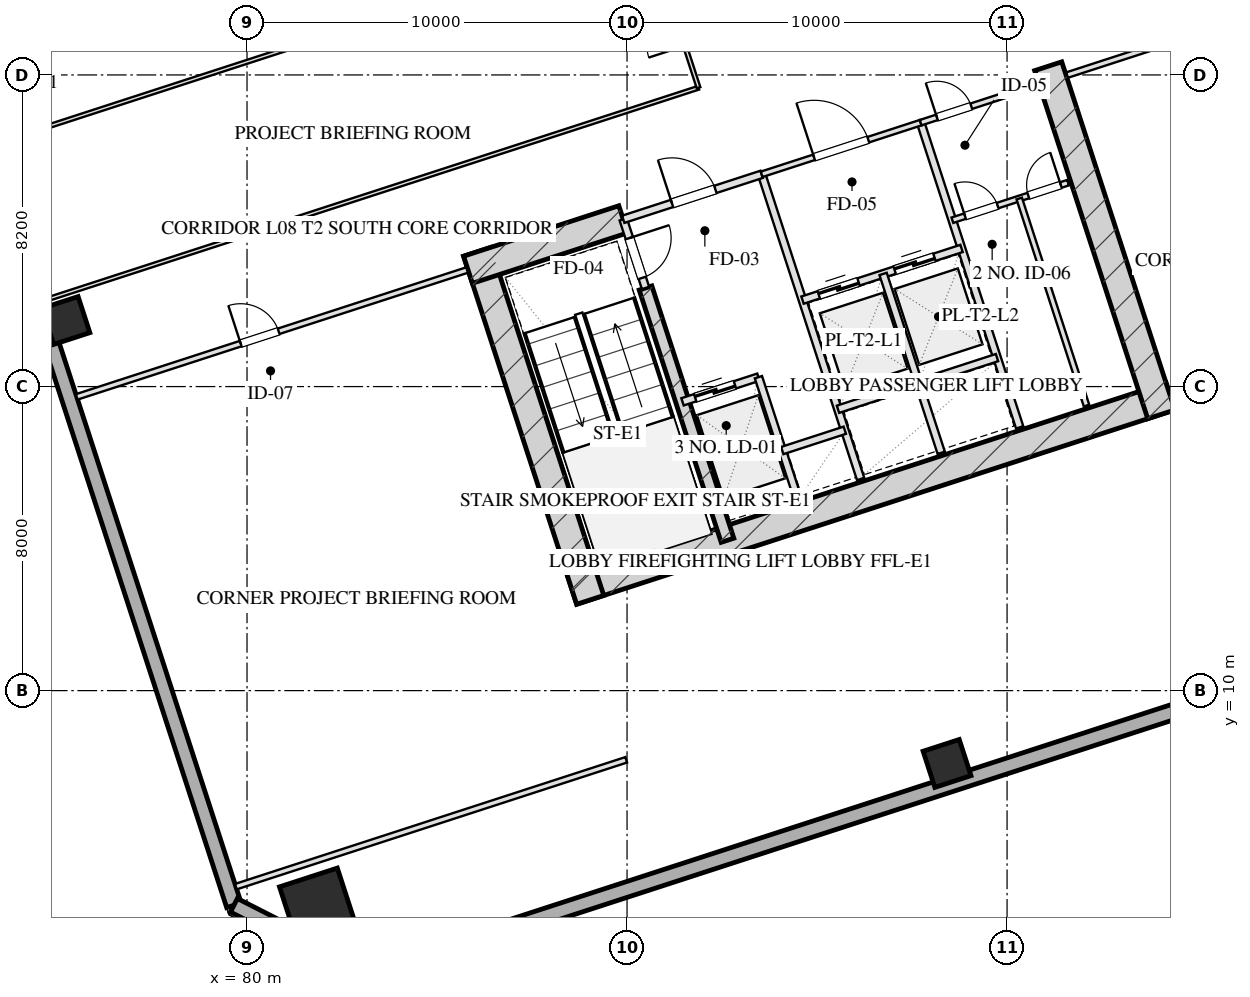
"""IFC4 building model, lengths in metres.
Left out: names, types, materials, properties, quantities, classifications, styles, units other than length and angle.
Written with IfcOpenShell. Run it as: python <this file> out.ifc"""

import sys

from ifc_helpers import new_model, si_unit, direction, frame, frame_2d, origin, origin_2d, place, context, subcontext, project, spatial, rectangle, hollow_rectangle, extrude, element, fill, save


model = new_model("IFC4")
c1 = context("Model", 3, precision=1e-05, world=origin(), true_north=direction((0.0, 1.0)))
c2 = subcontext(c1, "Body", "Model", "MODEL_VIEW")
j1 = project(units=[si_unit("LENGTHUNIT", "METRE"), si_unit("PLANEANGLEUNIT", "RADIAN")], contexts=[c1])
p1 = place(None, origin())
s1 = spatial("IfcSite", under=j1, at=p1, CompositionType="ELEMENT")
p2 = place(p1, origin())
s2 = spatial("IfcBuilding", under=s1, at=p2, CompositionType="ELEMENT")
p3 = place(p2, frame((0.0, 0.0, 38.0)))
s3 = spatial("IfcBuildingStorey", under=s2, at=p3, CompositionType="ELEMENT", Elevation=38.0)
p4 = place(p3, frame((88.559, 12.629, 0.0), z_axis=(0.0, 0.0, 1.0), x_axis=(0.951056072937, 0.309018358888, 0.0)))
e1 = element("IfcWall", 1, at=p4, inside=s3, PredefinedType="SHEAR", context=c2, shape_type="SweptSolid", body=[
    extrude(rectangle(XDim=16.55, YDim=0.75, at=frame_2d((8.275, 0.0))), origin(), (0.0, 0.0, 1.0), 4.0),
])
p5 = place(p3, frame((86.055, 21.546, 0.0), z_axis=(0.0, 0.0, 1.0), x_axis=(0.309023585745, -0.951054374604, 0.0)))
e2 = element("IfcWall", 2, at=p5, inside=s3, PredefinedType="SHEAR", context=c2, shape_type="SweptSolid", body=[
    extrude(rectangle(XDim=9.63, YDim=0.75, at=frame_2d((4.815, 0.0))), origin(), (0.0, 0.0, 1.0), 4.0),
])
p6 = place(p3, frame((101.082, 26.429, 0.0), z_axis=(0.0, 0.0, 1.0), x_axis=(0.309016134813, -0.951056795583, 0.0)))
e3 = element("IfcWall", 3, at=p6, inside=s3, PredefinedType="SHEAR", context=c2, shape_type="SweptSolid", body=[
    extrude(rectangle(XDim=9.63, YDim=0.75, at=frame_2d((4.815, 0.0))), origin(), (0.0, 0.0, 1.0), 4.0),
])
p7 = place(p3, frame((90.486, 20.594, 0.0), z_axis=(0.0, 0.0, 1.0), x_axis=(0.309020428229, -0.951055400562, 0.0)))
e4 = element("IfcWall", 4, at=p7, inside=s3, PredefinedType="SHEAR", context=c2, shape_type="SweptSolid", body=[
    extrude(rectangle(XDim=6.98, YDim=0.35, at=frame_2d((3.49, 0.0))), origin(), (0.0, 0.0, 1.0), 4.0),
])
p8 = place(p3, frame((85.814, 21.074, 0.0), z_axis=(0.0, 0.0, 1.0), x_axis=(0.95106580992, 0.308988390074, 0.0)))
e5 = element("IfcWall", 5, at=p8, inside=s3, PredefinedType="SHEAR", context=c2, shape_type="SweptSolid", body=[
    extrude(rectangle(XDim=4.295, YDim=0.75, at=frame_2d((2.147, 0.0))), origin(), (0.0, 0.0, 1.0), 4.0),
])
p9 = place(p3, frame((81.863, 4.323, 0.0), z_axis=(0.0, 0.0, 1.0), x_axis=(0.951056516295, 0.309016994375, 0.0)))
e6 = element("IfcColumn", 6, at=p9, inside=s3, PredefinedType="COLUMN", context=c2, shape_type="SweptSolid", body=[
    extrude(hollow_rectangle(XDim=1.6, YDim=1.6, WallThickness=0.055, at=origin_2d()), origin(), (0.0, 0.0, 1.0), 4.001),
])
for number, where, z_axis, x_axis in (
    (7, (75.234, 19.739, 0.0), (0.0, 0.0, 1.0), (0.951, 0.309, 0.0)),
    (8, (98.421, 8.084, 0.0), (0.0, 0.0, 1.0), (0.951, 0.309, 0.0)),
):
    element("IfcColumn", number, at=place(p3, frame(where, z_axis=z_axis, x_axis=x_axis)), inside=s3, PredefinedType="COLUMN", context=c2, shape_type="SweptSolid", body=[
        extrude(hollow_rectangle(XDim=1.0, YDim=1.0, WallThickness=0.036, at=origin_2d()), origin(), (0.0, 0.0, 1.0), 4.001),
    ])
p10 = place(p3, frame((79.655, 4.352, 0.0), z_axis=(0.0, 0.0, 1.0), x_axis=(-0.309014526607, 0.951057318118, 0.0)))
e9 = element("IfcWall", 9, at=p10, inside=s3, PredefinedType="SOLIDWALL", context=c2, shape_type="SweptSolid", body=[
    extrude(rectangle(XDim=50.0, YDim=0.4, at=frame_2d((25.0, 0.0))), origin(), (0.0, 0.0, 1.0), 3.16),
])
p11 = place(p10, frame((21.85, 0.0, 0.0)))
e10 = element("IfcOpeningElement", 10, at=p11, cuts=e9, PredefinedType="OPENING", context=c2, shape_type="SweptSolid", body=[
    extrude(rectangle(XDim=1.1, YDim=2.15, at=frame_2d((0.55, 1.075))), frame((0.0, 0.21, 0.0), z_axis=(0.0, -1.0, 0.0), x_axis=(1.0, 0.0, 0.0)), (0.0, 0.0, 1.0), 0.42),
])
p12 = place(p3, frame((100.345, 63.648, 0.0), z_axis=(0.0, 0.0, 1.0), x_axis=(0.309014526607, -0.951057318118, 0.0)))
e11 = element("IfcWall", 11, at=p12, inside=s3, PredefinedType="SOLIDWALL", context=c2, shape_type="SweptSolid", body=[
    extrude(rectangle(XDim=50.0, YDim=0.4, at=frame_2d((25.0, 0.0))), origin(), (0.0, 0.0, 1.0), 3.16),
])
p13 = place(p12, frame((17.35, 0.0, 0.75)))
e12 = element("IfcOpeningElement", 12, at=p13, cuts=e11, PredefinedType="OPENING", context=c2, shape_type="SweptSolid", body=[
    extrude(rectangle(XDim=2.5, YDim=1.75, at=frame_2d((1.25, 0.875))), frame((0.0, 0.21, 0.0), z_axis=(0.0, -1.0, 0.0), x_axis=(1.0, 0.0, 0.0)), (0.0, 0.0, 1.0), 0.42),
])
p14 = place(p12, frame((30.25, 0.0, 0.0)))
e13 = element("IfcOpeningElement", 13, at=p14, cuts=e11, PredefinedType="OPENING", context=c2, shape_type="SweptSolid", body=[
    extrude(rectangle(XDim=1.1, YDim=2.15, at=frame_2d((0.55, 1.075))), frame((0.0, 0.21, 0.0), z_axis=(0.0, -1.0, 0.0), x_axis=(1.0, 0.0, 0.0)), (0.0, 0.0, 1.0), 0.42),
])
p15 = place(p3, frame((113.998, 12.567, 0.0), z_axis=(0.0, 0.0, 1.0), x_axis=(-0.951055939317, -0.309018770125, 0.0)))
e14 = element("IfcWall", 14, at=p15, inside=s3, PredefinedType="SOLIDWALL", context=c2, shape_type="SweptSolid", body=[
    extrude(rectangle(XDim=32.4, YDim=0.4, at=frame_2d((16.2, 0.0))), origin(), (0.0, 0.0, 1.0), 3.16),
])
p16 = place(p3, frame((83.184, 2.554, 0.0), z_axis=(0.0, 0.0, 1.0), x_axis=(-0.890998089617, 0.454007053137, 0.0)))
e15 = element("IfcWall", 15, at=p16, inside=s3, PredefinedType="SOLIDWALL", context=c2, shape_type="SweptSolid", body=[
    extrude(rectangle(XDim=3.96, YDim=0.4, at=frame_2d((1.98, 0.0))), origin(), (0.0, 0.0, 1.0), 3.16),
])
p17 = place(p3, frame((89.899, 22.401, 0.0), z_axis=(0.0, 0.0, 1.0), x_axis=(0.308932062672, -0.951084108086, 0.0)))
e16 = element("IfcWall", 16, at=p17, inside=s3, PredefinedType="PARTITIONING", context=c2, shape_type="SweptSolid", body=[
    extrude(rectangle(XDim=1.9, YDim=0.2, at=frame_2d((0.95, 0.0))), origin(), (0.0, 0.0, 1.0), 3.725),
])
p18 = place(p17, frame((0.52, 0.0, 0.0)))
e17 = element("IfcOpeningElement", 17, at=p18, cuts=e16, PredefinedType="OPENING", context=c2, shape_type="SweptSolid", body=[
    extrude(rectangle(XDim=1.1, YDim=2.05, at=frame_2d((0.55, 1.025))), frame((0.0, 0.11, 0.0), z_axis=(0.0, -1.0, 0.0), x_axis=(1.0, 0.0, 0.0)), (0.0, 0.0, 1.0), 0.22),
])
p19 = place(p3, frame((93.542, 23.585, 0.0), z_axis=(0.0, 0.0, 1.0), x_axis=(0.309042196757, -0.951048327176, 0.0)))
e18 = element("IfcWall", 18, at=p19, inside=s3, PredefinedType="PARTITIONING", context=c2, shape_type="SweptSolid", body=[
    extrude(rectangle(XDim=8.43, YDim=0.2, at=frame_2d((4.215, 0.0))), origin(), (0.0, 0.0, 1.0), 3.725),
])
p20 = place(p3, frame((89.899, 22.401, 0.0), z_axis=(0.0, 0.0, 1.0), x_axis=(0.951046716504, 0.309047153403, 0.0)))
e19 = element("IfcWall", 19, at=p20, inside=s3, PredefinedType="PARTITIONING", context=c2, shape_type="SweptSolid", body=[
    extrude(rectangle(XDim=3.83, YDim=0.2, at=frame_2d((1.915, 0.0))), origin(), (0.0, 0.0, 1.0), 3.725),
])
p21 = place(p20, frame((1.35, 0.0, 0.0)))
e20 = element("IfcOpeningElement", 20, at=p21, cuts=e19, PredefinedType="OPENING", context=c2, shape_type="SweptSolid", body=[
    extrude(rectangle(XDim=1.2, YDim=2.05, at=frame_2d((0.6, 1.025))), frame((0.0, 0.11, 0.0), z_axis=(0.0, -1.0, 0.0), x_axis=(1.0, 0.0, 0.0)), (0.0, 0.0, 1.0), 0.22),
])
p22 = place(p3, frame((91.46, 17.598, 0.0), z_axis=(0.0, 0.0, 1.0), x_axis=(0.951062257173, 0.308999325213, 0.0)))
e21 = element("IfcWall", 21, at=p22, inside=s3, PredefinedType="PARTITIONING", context=c2, shape_type="SweptSolid", body=[
    extrude(rectangle(XDim=2.1, YDim=0.2, at=frame_2d((1.05, 0.0))), origin(), (0.0, 0.0, 1.0), 3.725),
])
p23 = place(p22, frame((0.35, 0.0, 0.0)))
e22 = element("IfcOpeningElement", 22, at=p23, cuts=e21, PredefinedType="OPENING", context=c2, shape_type="SweptSolid", body=[
    extrude(rectangle(XDim=1.1, YDim=2.05, at=frame_2d((0.55, 1.025))), frame((0.0, 0.11, 0.0), z_axis=(0.0, -1.0, 0.0), x_axis=(1.0, 0.0, 0.0)), (0.0, 0.0, 1.0), 0.22),
])
p24 = place(p3, frame((93.457, 18.247, 0.0), z_axis=(0.0, 0.0, 1.0), x_axis=(0.3089935693, -0.951064127245, 0.0)))
e23 = element("IfcWall", 23, at=p24, inside=s3, PredefinedType="PARTITIONING", context=c2, shape_type="SweptSolid", body=[
    extrude(rectangle(XDim=3.7, YDim=0.2, at=frame_2d((1.85, 0.0))), origin(), (0.0, 0.0, 1.0), 3.725),
])
p25 = place(p3, frame((94.084, 16.317, 0.0), z_axis=(0.0, 0.0, 1.0), x_axis=(0.951041328149, 0.309063734775, 0.0)))
e24 = element("IfcWall", 24, at=p25, inside=s3, PredefinedType="PARTITIONING", context=c2, shape_type="SweptSolid", body=[
    extrude(rectangle(XDim=1.73, YDim=0.2, at=frame_2d((0.865, 0.0))), origin(), (0.0, 0.0, 1.0), 3.725),
])
p26 = place(p3, frame((97.727, 24.944, 0.0), z_axis=(0.0, 0.0, 1.0), x_axis=(0.309016001439, -0.951056838919, 0.0)))
e25 = element("IfcWall", 25, at=p26, inside=s3, PredefinedType="PARTITIONING", context=c2, shape_type="SweptSolid", body=[
    extrude(rectangle(XDim=8.43, YDim=0.2, at=frame_2d((4.215, 0.0))), origin(), (0.0, 0.0, 1.0), 3.725),
])
p27 = place(p3, frame((93.542, 23.585, 0.0), z_axis=(0.0, 0.0, 1.0), x_axis=(0.951063829732, 0.308994485023, 0.0)))
e26 = element("IfcWall", 26, at=p27, inside=s3, PredefinedType="PARTITIONING", context=c2, shape_type="SweptSolid", body=[
    extrude(rectangle(XDim=4.4, YDim=0.15, at=frame_2d((2.2, 0.0))), origin(), (0.0, 0.0, 1.0), 3.725),
])
p28 = place(p27, frame((1.45, 0.0, 0.0)))
e27 = element("IfcOpeningElement", 27, at=p28, cuts=e26, PredefinedType="OPENING", context=c2, shape_type="SweptSolid", body=[
    extrude(rectangle(XDim=1.5, YDim=2.05, at=frame_2d((0.75, 1.025))), frame((0.0, 0.085, 0.0), z_axis=(0.0, -1.0, 0.0), x_axis=(1.0, 0.0, 0.0)), (0.0, 0.0, 1.0), 0.17),
])
p29 = place(p3, frame((94.617, 20.275, 0.0), z_axis=(0.0, 0.0, 1.0), x_axis=(0.951058531764, 0.30901079133, 0.0)))
e28 = element("IfcWall", 28, at=p29, inside=s3, PredefinedType="PARTITIONING", context=c2, shape_type="SweptSolid", body=[
    extrude(rectangle(XDim=4.4, YDim=0.2, at=frame_2d((2.2, 0.0))), origin(), (0.0, 0.0, 1.0), 3.725),
])
p30 = place(p29, frame((0.45, 0.0, 0.0)))
e29 = element("IfcOpeningElement", 29, at=p30, cuts=e28, PredefinedType="OPENING", context=c2, shape_type="SweptSolid", body=[
    extrude(rectangle(XDim=1.1, YDim=2.05, at=frame_2d((0.55, 1.025))), frame((0.0, 0.11, 0.0), z_axis=(0.0, -1.0, 0.0), x_axis=(1.0, 0.0, 0.0)), (0.0, 0.0, 1.0), 0.22),
])
p31 = place(p29, frame((2.55, 0.0, 0.0)))
e30 = element("IfcOpeningElement", 30, at=p31, cuts=e28, PredefinedType="OPENING", context=c2, shape_type="SweptSolid", body=[
    extrude(rectangle(XDim=1.1, YDim=2.05, at=frame_2d((0.55, 1.025))), frame((0.0, 0.11, 0.0), z_axis=(0.0, -1.0, 0.0), x_axis=(1.0, 0.0, 0.0)), (0.0, 0.0, 1.0), 0.22),
])
p32 = place(p3, frame((96.738, 20.964, 0.0), z_axis=(0.0, 0.0, 1.0), x_axis=(0.309042578481, -0.951048203135, 0.0)))
e31 = element("IfcWall", 31, at=p32, inside=s3, PredefinedType="PARTITIONING", context=c2, shape_type="SweptSolid", body=[
    extrude(rectangle(XDim=4.95, YDim=0.2, at=frame_2d((2.475, 0.0))), origin(), (0.0, 0.0, 1.0), 3.725),
])
p33 = place(p3, frame((95.551, 17.403, 0.0), z_axis=(0.0, 0.0, 1.0), x_axis=(0.951058531764, 0.30901079133, 0.0)))
e32 = element("IfcWall", 32, at=p33, inside=s3, PredefinedType="PARTITIONING", context=c2, shape_type="SweptSolid", body=[
    extrude(rectangle(XDim=4.4, YDim=0.2, at=frame_2d((2.2, 0.0))), origin(), (0.0, 0.0, 1.0), 3.725),
])
p34 = place(p3, frame((97.727, 24.944, 0.0), z_axis=(0.0, 0.0, 1.0), x_axis=(0.951036872128, 0.309077446369, 0.0)))
e33 = element("IfcWall", 33, at=p34, inside=s3, PredefinedType="PARTITIONING", context=c2, shape_type="SweptSolid", body=[
    extrude(rectangle(XDim=3.2, YDim=0.15, at=frame_2d((1.6, 0.0))), origin(), (0.0, 0.0, 1.0), 3.725),
])
p35 = place(p34, frame((0.45, 0.0, 0.0)))
e34 = element("IfcOpeningElement", 34, at=p35, cuts=e33, PredefinedType="OPENING", context=c2, shape_type="SweptSolid", body=[
    extrude(rectangle(XDim=0.95, YDim=2.05, at=frame_2d((0.475, 1.025))), frame((0.0, 0.085, 0.0), z_axis=(0.0, -1.0, 0.0), x_axis=(1.0, 0.0, 0.0)), (0.0, 0.0, 1.0), 0.17),
])
p36 = place(p3, frame((98.561, 22.376, 0.0), z_axis=(0.0, 0.0, 1.0), x_axis=(0.95104415986, 0.309055020985, 0.0)))
e35 = element("IfcWall", 35, at=p36, inside=s3, PredefinedType="PARTITIONING", context=c2, shape_type="SweptSolid", body=[
    extrude(rectangle(XDim=3.2, YDim=0.15, at=frame_2d((1.6, 0.0))), origin(), (0.0, 0.0, 1.0), 3.725),
])
p37 = place(p36, frame((0.35, 0.0, 0.0)))
e36 = element("IfcOpeningElement", 36, at=p37, cuts=e35, PredefinedType="OPENING", context=c2, shape_type="SweptSolid", body=[
    extrude(rectangle(XDim=0.9, YDim=2.05, at=frame_2d((0.45, 1.025))), frame((0.0, 0.085, 0.0), z_axis=(0.0, -1.0, 0.0), x_axis=(1.0, 0.0, 0.0)), (0.0, 0.0, 1.0), 0.17),
])
p38 = place(p36, frame((2.1, 0.0, 0.0)))
e37 = element("IfcOpeningElement", 37, at=p38, cuts=e35, PredefinedType="OPENING", context=c2, shape_type="SweptSolid", body=[
    extrude(rectangle(XDim=0.9, YDim=2.05, at=frame_2d((0.45, 1.025))), frame((0.0, 0.085, 0.0), z_axis=(0.0, -1.0, 0.0), x_axis=(1.0, 0.0, 0.0)), (0.0, 0.0, 1.0), 0.17),
])
p39 = place(p3, frame((100.32, 22.948, 0.0), z_axis=(0.0, 0.0, 1.0), x_axis=(0.309035009867, -0.951050662518, 0.0)))
e38 = element("IfcWall", 38, at=p39, inside=s3, PredefinedType="PARTITIONING", context=c2, shape_type="SweptSolid", body=[
    extrude(rectangle(XDim=5.73, YDim=0.15, at=frame_2d((2.865, 0.0))), origin(), (0.0, 0.0, 1.0), 3.725),
])
p40 = place(p3, frame((79.707, 4.842, 0.0), z_axis=(0.0, 0.0, 1.0), x_axis=(0.951056658866, 0.309016555588, 0.0)))
e39 = element("IfcWall", 39, at=p40, inside=s3, PredefinedType="PARTITIONING", context=c2, shape_type="SweptSolid", body=[
    extrude(rectangle(XDim=10.8, YDim=0.15, at=frame_2d((5.4, 0.0))), origin(), (0.0, 0.0, 1.0), 3.725),
])
p41 = place(p3, frame((75.519, 17.729, 0.0), z_axis=(0.0, 0.0, 1.0), x_axis=(0.951056658866, 0.309016555588, 0.0)))
e40 = element("IfcWall", 40, at=p41, inside=s3, PredefinedType="PARTITIONING", context=c2, shape_type="SweptSolid", body=[
    extrude(rectangle(XDim=10.8, YDim=0.15, at=frame_2d((5.4, 0.0))), origin(), (0.0, 0.0, 1.0), 3.725),
])
p42 = place(p41, frame((4.536, 0.0, 0.0)))
e41 = element("IfcOpeningElement", 41, at=p42, cuts=e40, PredefinedType="OPENING", context=c2, shape_type="SweptSolid", body=[
    extrude(rectangle(XDim=1.05, YDim=2.05, at=frame_2d((0.525, 1.025))), frame((0.0, 0.085, 0.0), z_axis=(0.0, -1.0, 0.0), x_axis=(1.0, 0.0, 0.0)), (0.0, 0.0, 1.0), 0.17),
])
p43 = place(p3, frame((101.578, 26.196, 0.0), z_axis=(0.0, 0.0, 1.0), x_axis=(0.951059043131, 0.309009217467, 0.0)))
e42 = element("IfcWall", 42, at=p43, inside=s3, PredefinedType="PARTITIONING", context=c2, shape_type="SweptSolid", body=[
    extrude(rectangle(XDim=10.2, YDim=0.15, at=frame_2d((5.1, 0.0))), origin(), (0.0, 0.0, 1.0), 3.725),
])
p44 = place(p43, frame((4.284, 0.0, 0.0)))
e43 = element("IfcOpeningElement", 43, at=p44, cuts=e42, PredefinedType="OPENING", context=c2, shape_type="SweptSolid", body=[
    extrude(rectangle(XDim=1.0, YDim=2.05, at=frame_2d((0.5, 1.025))), frame((0.0, 0.085, 0.0), z_axis=(0.0, -1.0, 0.0), x_axis=(1.0, 0.0, 0.0)), (0.0, 0.0, 1.0), 0.17),
])
p45 = place(p3, frame((74.691, 20.278, 0.0), z_axis=(0.0, 0.0, 1.0), x_axis=(0.951053521786, 0.309026210375, 0.0)))
e44 = element("IfcWall", 44, at=p45, inside=s3, PredefinedType="MOVABLE", context=c2, shape_type="SweptSolid", body=[
    extrude(rectangle(XDim=18.075, YDim=0.1, at=frame_2d((9.038, 0.0))), origin(), (0.0, 0.0, 1.0), 3.725),
])
p46 = place(p3, frame((91.882, 25.863, 0.0), z_axis=(0.0, 0.0, 1.0), x_axis=(-0.309022042254, 0.951054876125, 0.0)))
e45 = element("IfcWall", 45, at=p46, inside=s3, PredefinedType="MOVABLE", context=c2, shape_type="SweptSolid", body=[
    extrude(rectangle(XDim=16.64, YDim=0.1, at=frame_2d((8.32, 0.0))), origin(), (0.0, 0.0, 1.0), 3.725),
])
p47 = place(p46, frame((1.16, 0.0, 0.0)))
e46 = element("IfcOpeningElement", 46, at=p47, cuts=e45, PredefinedType="OPENING", context=c2, shape_type="SweptSolid", body=[
    extrude(rectangle(XDim=1.0, YDim=2.05, at=frame_2d((0.5, 1.025))), frame((0.0, 0.06, 0.0), z_axis=(0.0, -1.0, 0.0), x_axis=(1.0, 0.0, 0.0)), (0.0, 0.0, 1.0), 0.12),
])
p48 = place(p46, frame((6.16, 0.0, 0.0)))
e47 = element("IfcOpeningElement", 47, at=p48, cuts=e45, PredefinedType="OPENING", context=c2, shape_type="SweptSolid", body=[
    extrude(rectangle(XDim=1.0, YDim=2.05, at=frame_2d((0.5, 1.025))), frame((0.0, 0.06, 0.0), z_axis=(0.0, -1.0, 0.0), x_axis=(1.0, 0.0, 0.0)), (0.0, 0.0, 1.0), 0.12),
])
p49 = place(p46, frame((10.16, 0.0, 0.0)))
e48 = element("IfcOpeningElement", 48, at=p49, cuts=e45, PredefinedType="OPENING", context=c2, shape_type="SweptSolid", body=[
    extrude(rectangle(XDim=1.0, YDim=2.05, at=frame_2d((0.5, 1.025))), frame((0.0, 0.06, 0.0), z_axis=(0.0, -1.0, 0.0), x_axis=(1.0, 0.0, 0.0)), (0.0, 0.0, 1.0), 0.12),
])
p50 = place(p46, frame((14.48, 0.0, 0.0)))
e49 = element("IfcOpeningElement", 49, at=p50, cuts=e45, PredefinedType="OPENING", context=c2, shape_type="SweptSolid", body=[
    extrude(rectangle(XDim=1.05, YDim=2.05, at=frame_2d((0.525, 1.025))), frame((0.0, 0.06, 0.0), z_axis=(0.0, -1.0, 0.0), x_axis=(1.0, 0.0, 0.0)), (0.0, 0.0, 1.0), 0.12),
])
p51 = place(p3, frame((73.356, 24.386, 0.0), z_axis=(0.0, 0.0, 1.0), x_axis=(0.951057491432, 0.309013993197, 0.0)))
e50 = element("IfcWall", 50, at=p51, inside=s3, PredefinedType="MOVABLE", context=c2, shape_type="SweptSolid", body=[
    extrude(rectangle(XDim=18.075, YDim=0.1, at=frame_2d((9.038, 0.0))), origin(), (0.0, 0.0, 1.0), 3.725),
])
p52 = place(p18, origin())
e51 = element("IfcDoor", 51, at=p52, inside=s3, OperationType="SINGLE_SWING_LEFT", PredefinedType="DOOR", context=c2, shape_type="SweptSolid", body=[
    extrude(rectangle(XDim=1.1, YDim=2.05, at=frame_2d((0.55, 1.025))), frame((0.0, 0.025, 0.0), z_axis=(0.0, -1.0, 0.0), x_axis=(1.0, 0.0, 0.0)), (0.0, 0.0, 1.0), 0.05),
])
fill(e17, e51)
p53 = place(p21, origin())
e52 = element("IfcDoor", 52, at=p53, inside=s3, OperationType="SINGLE_SWING_LEFT", PredefinedType="DOOR", context=c2, shape_type="SweptSolid", body=[
    extrude(rectangle(XDim=1.2, YDim=2.05, at=frame_2d((0.6, 1.025))), frame((0.0, 0.025, 0.0), z_axis=(0.0, -1.0, 0.0), x_axis=(1.0, 0.0, 0.0)), (0.0, 0.0, 1.0), 0.05),
])
fill(e20, e52)
p54 = place(p23, origin())
e53 = element("IfcDoor", 53, at=p54, inside=s3, OperationType="DOUBLE_DOOR_SLIDING", PredefinedType="DOOR", context=c2, shape_type="SweptSolid", body=[
    extrude(rectangle(XDim=1.1, YDim=2.05, at=frame_2d((0.55, 1.025))), frame((0.0, 0.025, 0.0), z_axis=(0.0, -1.0, 0.0), x_axis=(1.0, 0.0, 0.0)), (0.0, 0.0, 1.0), 0.05),
])
fill(e22, e53)
p55 = place(p28, origin())
e54 = element("IfcDoor", 54, at=p55, inside=s3, OperationType="SINGLE_SWING_LEFT", PredefinedType="DOOR", context=c2, shape_type="SweptSolid", body=[
    extrude(rectangle(XDim=1.5, YDim=2.05, at=frame_2d((0.75, 1.025))), frame((0.0, 0.025, 0.0), z_axis=(0.0, -1.0, 0.0), x_axis=(1.0, 0.0, 0.0)), (0.0, 0.0, 1.0), 0.05),
])
fill(e27, e54)
p56 = place(p30, origin())
e55 = element("IfcDoor", 55, at=p56, inside=s3, OperationType="DOUBLE_DOOR_SLIDING", PredefinedType="DOOR", context=c2, shape_type="SweptSolid", body=[
    extrude(rectangle(XDim=1.1, YDim=2.05, at=frame_2d((0.55, 1.025))), frame((0.0, 0.025, 0.0), z_axis=(0.0, -1.0, 0.0), x_axis=(1.0, 0.0, 0.0)), (0.0, 0.0, 1.0), 0.05),
])
fill(e29, e55)
p57 = place(p31, origin())
e56 = element("IfcDoor", 56, at=p57, inside=s3, OperationType="DOUBLE_DOOR_SLIDING", PredefinedType="DOOR", context=c2, shape_type="SweptSolid", body=[
    extrude(rectangle(XDim=1.1, YDim=2.05, at=frame_2d((0.55, 1.025))), frame((0.0, 0.025, 0.0), z_axis=(0.0, -1.0, 0.0), x_axis=(1.0, 0.0, 0.0)), (0.0, 0.0, 1.0), 0.05),
])
fill(e30, e56)
p58 = place(p35, origin())
e57 = element("IfcDoor", 57, at=p58, inside=s3, OperationType="SINGLE_SWING_LEFT", PredefinedType="DOOR", context=c2, shape_type="SweptSolid", body=[
    extrude(rectangle(XDim=0.95, YDim=2.05, at=frame_2d((0.475, 1.025))), frame((0.0, 0.025, 0.0), z_axis=(0.0, -1.0, 0.0), x_axis=(1.0, 0.0, 0.0)), (0.0, 0.0, 1.0), 0.05),
])
fill(e34, e57)
p59 = place(p37, origin())
e58 = element("IfcDoor", 58, at=p59, inside=s3, OperationType="SINGLE_SWING_LEFT", PredefinedType="DOOR", context=c2, shape_type="SweptSolid", body=[
    extrude(rectangle(XDim=0.9, YDim=2.05, at=frame_2d((0.45, 1.025))), frame((0.0, 0.025, 0.0), z_axis=(0.0, -1.0, 0.0), x_axis=(1.0, 0.0, 0.0)), (0.0, 0.0, 1.0), 0.05),
])
fill(e36, e58)
p60 = place(p38, origin())
e59 = element("IfcDoor", 59, at=p60, inside=s3, OperationType="SINGLE_SWING_RIGHT", PredefinedType="DOOR", context=c2, shape_type="SweptSolid", body=[
    extrude(rectangle(XDim=0.9, YDim=2.05, at=frame_2d((0.45, 1.025))), frame((0.0, 0.025, 0.0), z_axis=(0.0, -1.0, 0.0), x_axis=(1.0, 0.0, 0.0)), (0.0, 0.0, 1.0), 0.05),
])
fill(e37, e59)
p61 = place(p42, origin())
e60 = element("IfcDoor", 60, at=p61, inside=s3, OperationType="SINGLE_SWING_LEFT", PredefinedType="DOOR", context=c2, shape_type="SweptSolid", body=[
    extrude(rectangle(XDim=1.05, YDim=2.05, at=frame_2d((0.525, 1.025))), frame((0.0, 0.025, 0.0), z_axis=(0.0, -1.0, 0.0), x_axis=(1.0, 0.0, 0.0)), (0.0, 0.0, 1.0), 0.05),
])
fill(e41, e60)
save(model, sys.argv[1])
